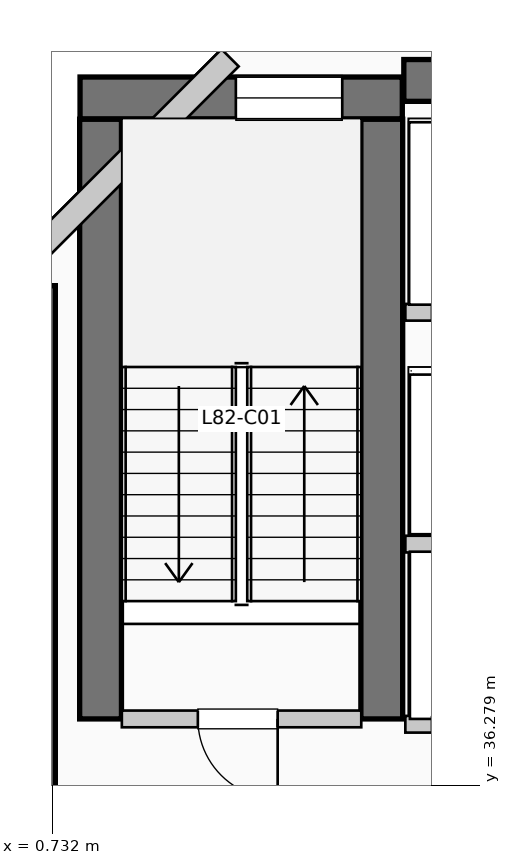
"""IFC4 building model, lengths in metres.
Left out: names, types, materials, properties, quantities, classifications, styles, units other than length and angle.
Written with IfcOpenShell. Run it as: python <this file> out.ifc"""

import sys

from ifc_helpers import new_model, si_unit, direction, frame, frame_2d, origin, place, context, subcontext, project, spatial, rectangle, extrude, element, fill, save


model = new_model("IFC4")
c1 = context("Model", 3, precision=1e-05, world=origin(), true_north=direction((0.0, 1.0)))
c2 = subcontext(c1, "Body", "Model", "MODEL_VIEW")
j1 = project(units=[si_unit("LENGTHUNIT", "METRE"), si_unit("PLANEANGLEUNIT", "RADIAN")], contexts=[c1])
p1 = place(None, origin())
s1 = spatial("IfcSite", under=j1, at=p1, CompositionType="ELEMENT")
p2 = place(p1, origin())
s2 = spatial("IfcBuilding", under=s1, at=p2, CompositionType="ELEMENT")
p3 = place(p2, frame((0.0, 0.0, 335.61)))
s3 = spatial("IfcBuildingStorey", under=s2, at=p3, CompositionType="ELEMENT", Elevation=335.61)
p4 = place(p3, frame((5.36, 45.55, 0.0), z_axis=(0.0, 0.0, 1.0), x_axis=(1.0, 0.0, 0.0)))
e1 = element("IfcWall", 1, at=p4, inside=s3, PredefinedType="SHEAR", context=c2, shape_type="SweptSolid", body=[
    extrude(rectangle(XDim=13.98, YDim=0.55, at=frame_2d((6.99, 0.0))), origin(), (0.0, 0.0, 1.0), 3.96),
])
p5 = place(p3, frame((0.5, 34.95, 0.0), z_axis=(0.0, 0.0, 1.0), x_axis=(0.0, 1.0, 0.0)))
e2 = element("IfcWall", 2, at=p5, inside=s3, PredefinedType="SHEAR", context=c2, shape_type="SweptSolid", body=[
    extrude(rectangle(XDim=7.9, YDim=0.55, at=frame_2d((3.95, 0.0))), origin(), (0.0, 0.0, 1.0), 3.96),
])
for number, where, z_axis, x_axis in (
    (3, (1.37, 37.15, 0.0), (0.0, 0.0, 1.0), (0.0, 1.0, 0.0)),
    (4, (5.07, 37.15, 0.0), (0.0, 0.0, 1.0), (0.0, 1.0, 0.0)),
):
    element("IfcWall", number, at=place(p3, frame(where, z_axis=z_axis, x_axis=x_axis)), inside=s3, PredefinedType="SHEAR", context=c2, shape_type="SweptSolid", body=[
        extrude(rectangle(XDim=7.89, YDim=0.55, at=frame_2d((3.945, 0.0))), origin(), (0.0, 0.0, 1.0), 3.96),
    ])
p6 = place(p3, frame((1.1, 45.32, 0.0), z_axis=(0.0, 0.0, 1.0), x_axis=(1.0, 0.0, 0.0)))
e5 = element("IfcWall", 5, at=p6, inside=s3, PredefinedType="SHEAR", context=c2, shape_type="SweptSolid", body=[
    extrude(rectangle(XDim=4.24, YDim=0.55, at=frame_2d((2.12, 0.0))), origin(), (0.0, 0.0, 1.0), 3.96),
])
p7 = place(p6, frame((2.05, 0.0, 1.05)))
e6 = element("IfcOpeningElement", 6, at=p7, cuts=e5, PredefinedType="OPENING", context=c2, shape_type="SweptSolid", body=[
    extrude(rectangle(XDim=1.4, YDim=1.8, at=frame_2d((0.7, 0.9))), frame((0.0, 0.285, 0.0), z_axis=(0.0, -1.0, 0.0), x_axis=(1.0, 0.0, 0.0)), (0.0, 0.0, 1.0), 0.57),
])
p8 = place(p3, frame((3.074, 45.848, 0.0), z_axis=(0.0, 0.0, 1.0), x_axis=(-0.707106781187, -0.707106781187, 0.0)))
e7 = element("IfcWall", 7, at=p8, inside=s3, PredefinedType="SOLIDWALL", context=c2, shape_type="SweptSolid", body=[
    extrude(rectangle(XDim=4.133, YDim=0.32, at=frame_2d((2.066, 0.0))), origin(), (0.0, 0.0, 1.0), 3.74),
])
p9 = place(p3, frame((1.65, 37.15, 0.0), z_axis=(0.0, 0.0, 1.0), x_axis=(1.0, 0.0, 0.0)))
e8 = element("IfcWall", 8, at=p9, inside=s3, PredefinedType="PARTITIONING", context=c2, shape_type="SweptSolid", body=[
    extrude(rectangle(XDim=3.15, YDim=0.22, at=frame_2d((1.575, 0.0))), origin(), (0.0, 0.0, 1.0), 3.74),
])
p10 = place(p9, frame((2.05, 0.0, 0.0), z_axis=(0.0, 0.0, 1.0), x_axis=(-1.0, 0.0, 0.0)))
e9 = element("IfcOpeningElement", 9, at=p10, cuts=e8, PredefinedType="OPENING", context=c2, shape_type="SweptSolid", body=[
    extrude(rectangle(XDim=1.05, YDim=2.15, at=frame_2d((0.525, 1.075))), frame((0.0, 0.12, 0.0), z_axis=(0.0, -1.0, 0.0), x_axis=(1.0, 0.0, 0.0)), (0.0, 0.0, 1.0), 0.24),
])
p11 = place(p3, frame((5.38, 37.08, 0.0), z_axis=(0.0, 0.0, 1.0), x_axis=(1.0, 0.0, 0.0)))
e10 = element("IfcWall", 10, at=p11, inside=s3, PredefinedType="PARTITIONING", context=c2, shape_type="SweptSolid", body=[
    extrude(rectangle(XDim=3.46, YDim=0.22, at=frame_2d((1.73, 0.0))), origin(), (0.0, 0.0, 1.0), 3.74),
])
p12 = place(p11, frame((1.55, 0.0, 0.0), z_axis=(0.0, 0.0, 1.0), x_axis=(-1.0, 0.0, 0.0)))
e11 = element("IfcOpeningElement", 11, at=p12, cuts=e10, PredefinedType="OPENING", context=c2, shape_type="SweptSolid", body=[
    extrude(rectangle(XDim=1.2, YDim=2.2, at=frame_2d((0.6, 1.1))), frame((0.0, 0.12, 0.0), z_axis=(0.0, -1.0, 0.0), x_axis=(1.0, 0.0, 0.0)), (0.0, 0.0, 1.0), 0.24),
])
p13 = place(p11, frame((3.22, 0.0, 0.0), z_axis=(0.0, 0.0, 1.0), x_axis=(-1.0, 0.0, 0.0)))
e12 = element("IfcOpeningElement", 12, at=p13, cuts=e10, PredefinedType="OPENING", context=c2, shape_type="SweptSolid", body=[
    extrude(rectangle(XDim=1.2, YDim=2.2, at=frame_2d((0.6, 1.1))), frame((0.0, 0.12, 0.0), z_axis=(0.0, -1.0, 0.0), x_axis=(1.0, 0.0, 0.0)), (0.0, 0.0, 1.0), 0.24),
])
p14 = place(p3, frame((5.38, 39.45, 0.0), z_axis=(0.0, 0.0, 1.0), x_axis=(1.0, 0.0, 0.0)))
e13 = element("IfcWall", 13, at=p14, inside=s3, PredefinedType="PARTITIONING", context=c2, shape_type="SweptSolid", body=[
    extrude(rectangle(XDim=3.46, YDim=0.22, at=frame_2d((1.73, 0.0))), origin(), (0.0, 0.0, 1.0), 3.74),
])
p15 = place(p3, frame((5.38, 42.5, 0.0), z_axis=(0.0, 0.0, 1.0), x_axis=(1.0, 0.0, 0.0)))
e14 = element("IfcWall", 14, at=p15, inside=s3, PredefinedType="PARTITIONING", context=c2, shape_type="SweptSolid", body=[
    extrude(rectangle(XDim=3.77, YDim=0.22, at=frame_2d((1.885, 0.0))), origin(), (0.0, 0.0, 1.0), 3.74),
])
p16 = place(p15, frame((1.75, 0.0, 0.0), z_axis=(0.0, 0.0, 1.0), x_axis=(-1.0, 0.0, 0.0)))
e15 = element("IfcOpeningElement", 15, at=p16, cuts=e14, PredefinedType="OPENING", context=c2, shape_type="SweptSolid", body=[
    extrude(rectangle(XDim=1.4, YDim=2.2, at=frame_2d((0.7, 1.1))), frame((0.0, 0.12, 0.0), z_axis=(0.0, -1.0, 0.0), x_axis=(1.0, 0.0, 0.0)), (0.0, 0.0, 1.0), 0.24),
])
p17 = place(p15, frame((3.53, 0.0, 0.0), z_axis=(0.0, 0.0, 1.0), x_axis=(-1.0, 0.0, 0.0)))
e16 = element("IfcOpeningElement", 16, at=p17, cuts=e14, PredefinedType="OPENING", context=c2, shape_type="SweptSolid", body=[
    extrude(rectangle(XDim=1.4, YDim=2.2, at=frame_2d((0.7, 1.1))), frame((0.0, 0.12, 0.0), z_axis=(0.0, -1.0, 0.0), x_axis=(1.0, 0.0, 0.0)), (0.0, 0.0, 1.0), 0.24),
])
p18 = place(p7, origin())
e17 = element("IfcWindow", 17, at=p18, inside=s3, PartitioningType="SINGLE_PANEL", PredefinedType="WINDOW", context=c2, shape_type="SweptSolid", body=[
    extrude(rectangle(XDim=1.4, YDim=1.8, at=frame_2d((0.7, 0.9))), frame((0.0, 0.03, 0.0), z_axis=(0.0, -1.0, 0.0), x_axis=(1.0, 0.0, 0.0)), (0.0, 0.0, 1.0), 0.06),
])
fill(e6, e17)
p19 = place(p10, origin())
e18 = element("IfcDoor", 18, at=p19, inside=s3, OperationType="SINGLE_SWING_RIGHT", PredefinedType="DOOR", context=c2, shape_type="SweptSolid", body=[
    extrude(rectangle(XDim=1.05, YDim=2.15, at=frame_2d((0.525, 1.075))), frame((0.0, 0.025, 0.0), z_axis=(0.0, -1.0, 0.0), x_axis=(1.0, 0.0, 0.0)), (0.0, 0.0, 1.0), 0.05),
])
fill(e9, e18)
save(model, sys.argv[1])
